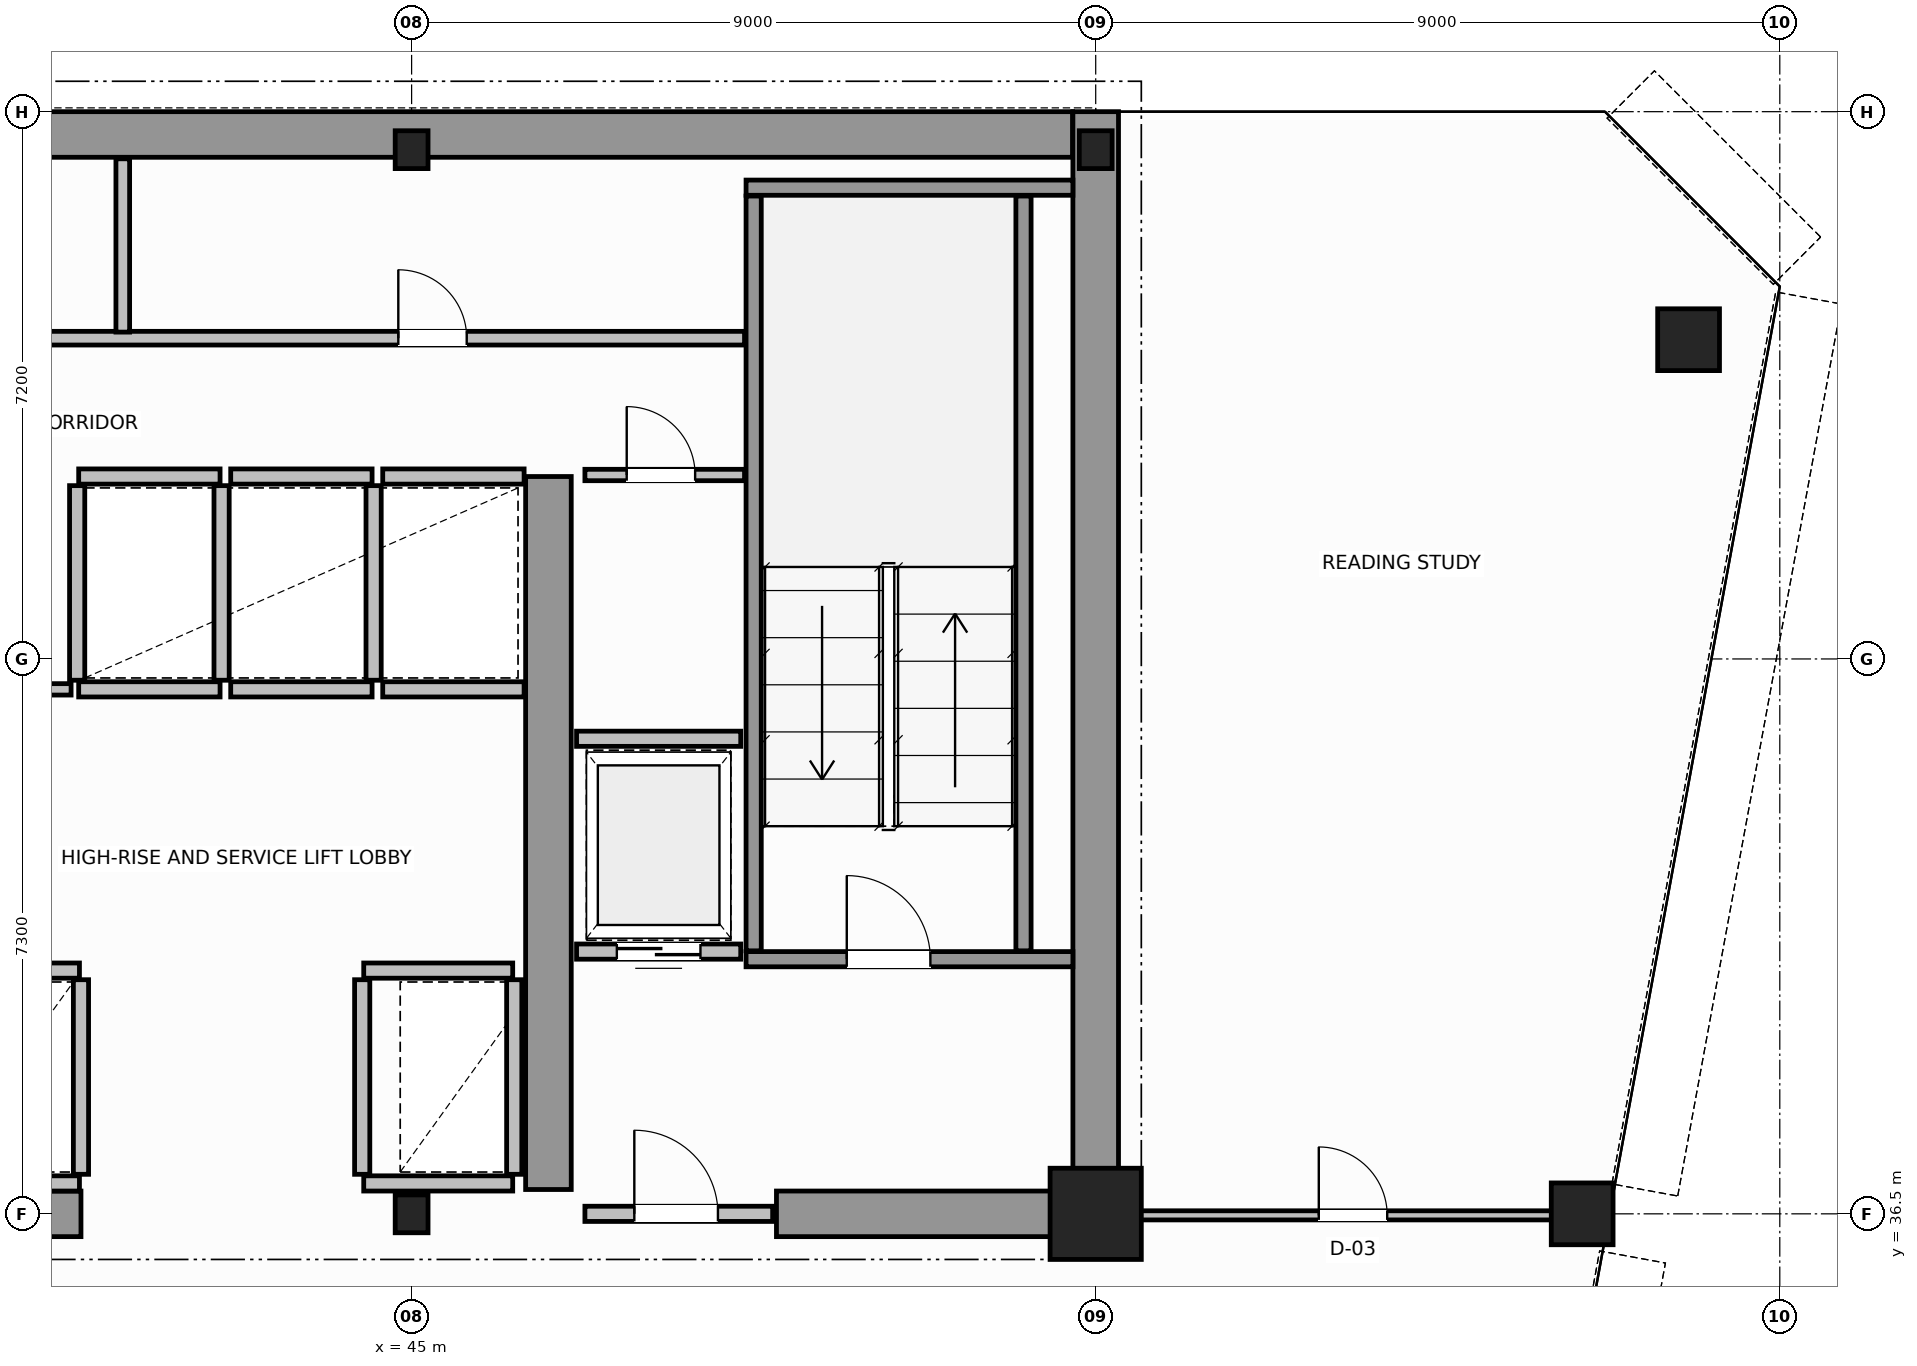
"""IFC4 building model, lengths in metres.
Left out: names, types, materials, properties, quantities, classifications, styles, units other than length and angle.
Written with IfcOpenShell. Run it as: python <this file> out.ifc"""

import sys

from ifc_helpers import new_model, si_unit, direction, frame, frame_2d, origin, origin_2d, place, context, subcontext, project, spatial, rectangle, hollow_circle, i_section, extrude, source, transform, mapped, element, fill, save


model = new_model("IFC4")
c1 = context("Model", 3, precision=1e-05, world=origin(), true_north=direction((0.0, 1.0)))
c2 = subcontext(c1, "Body", "Model", "MODEL_VIEW")
j1 = project(units=[si_unit("LENGTHUNIT", "METRE"), si_unit("PLANEANGLEUNIT", "RADIAN")], contexts=[c1])
p1 = place(None, origin())
s1 = spatial("IfcSite", under=j1, at=p1, CompositionType="ELEMENT")
p2 = place(p1, origin())
s2 = spatial("IfcBuilding", under=s1, at=p2, CompositionType="ELEMENT")
p3 = place(p2, frame((0.0, 0.0, 191.8)))
s3 = spatial("IfcBuildingStorey", under=s2, at=p3, CompositionType="ELEMENT", Elevation=191.8)
m1 = source(origin(), c2, "Body", "SweptSolid", [
    extrude(i_section(OverallWidth=0.432, OverallDepth=0.498, WebThickness=0.055, FlangeThickness=0.068, FilletRadius=0.015, at=origin_2d()), origin(), (0.0, 0.0, 1.0), 3.8),
])
p4 = place(p3, frame((45.0, 36.5, 0.0), z_axis=(0.0, 0.0, 1.0), x_axis=(1.0, 0.0, 0.0)))
e1 = element("IfcColumn", 1, at=p4, inside=s3, PredefinedType="COLUMN", context=c2, shape_type="MappedRepresentation", body=[
    mapped(m1, transform((0.0, 0.0, 0.0), scale=1.0)),
])
m2 = source(origin(), c2, "Body", "SweptSolid", [
    extrude(rectangle(XDim=1.2, YDim=1.2, at=origin_2d()), origin(), (0.0, 0.0, 1.0), 3.8),
])
p5 = place(p3, frame((54.0, 36.5, 0.0), z_axis=(0.0, 0.0, 1.0), x_axis=(1.0, 0.0, 0.0)))
e2 = element("IfcColumn", 2, at=p5, inside=s3, PredefinedType="COLUMN", context=c2, shape_type="MappedRepresentation", body=[
    mapped(m2, transform((0.0, 0.0, 0.0), scale=1.0)),
])
for number, where, z_axis, x_axis in (
    (3, (45.0, 50.5, 0.0), (0.0, 0.0, 1.0), (1.0, 0.0, 0.0)),
    (4, (54.0, 50.5, 0.0), (0.0, 0.0, 1.0), (1.0, 0.0, 0.0)),
):
    element("IfcColumn", number, at=place(p3, frame(where, z_axis=z_axis, x_axis=x_axis)), inside=s3, PredefinedType="COLUMN", context=c2, shape_type="MappedRepresentation", body=[
        mapped(m1, transform((0.0, 0.0, 0.0), scale=1.0)),
    ])
m3 = source(origin(), c2, "Body", "SweptSolid", [
    extrude(hollow_circle(Radius=0.406, WallThickness=0.04, at=origin_2d()), origin(), (0.0, 0.0, 1.0), 3.8),
])
for number, where, z_axis, x_axis in (
    (5, (61.8, 48.0, 0.0), (0.0, 0.0, 1.0), (1.0, 0.0, 0.0)),
    (6, (60.4, 36.5, 0.0), (0.0, 0.0, 1.0), (1.0, 0.0, 0.0)),
):
    element("IfcColumn", number, at=place(p3, frame(where, z_axis=z_axis, x_axis=x_axis)), inside=s3, PredefinedType="COLUMN", context=c2, shape_type="MappedRepresentation", body=[
        mapped(m3, transform((0.0, 0.0, 0.0), scale=1.0)),
    ])
p6 = place(p3, frame((34.002, 50.7, 0.0), z_axis=(0.0, 0.0, 1.0), x_axis=(1.0, 0.0, 0.0)))
e7 = element("IfcWall", 7, at=p6, inside=s3, PredefinedType="SHEAR", context=c2, shape_type="SweptSolid", body=[
    extrude(rectangle(XDim=19.694, YDim=0.6, at=frame_2d((9.847, 0.0))), origin(), (0.0, 0.0, 1.0), 3.8),
])
p7 = place(p3, frame((54.0, 36.5, 0.0), z_axis=(0.0, 0.0, 1.0), x_axis=(0.0, 1.0, 0.0)))
e8 = element("IfcWall", 8, at=p7, inside=s3, PredefinedType="SHEAR", context=c2, shape_type="SweptSolid", body=[
    extrude(rectangle(XDim=14.5, YDim=0.6, at=frame_2d((7.25, 0.0))), origin(), (0.0, 0.0, 1.0), 3.8),
])
p8 = place(p3, frame((36.15, 36.5, 0.0), z_axis=(0.0, 0.0, 1.0), x_axis=(1.0, 0.0, 0.0)))
e9 = element("IfcWall", 9, at=p8, inside=s3, PredefinedType="SHEAR", context=c2, shape_type="SweptSolid", body=[
    extrude(rectangle(XDim=4.5, YDim=0.6, at=frame_2d((2.25, 0.0))), origin(), (0.0, 0.0, 1.0), 3.8),
])
p9 = place(p3, frame((49.8, 36.5, 0.0), z_axis=(0.0, 0.0, 1.0), x_axis=(1.0, 0.0, 0.0)))
e10 = element("IfcWall", 10, at=p9, inside=s3, PredefinedType="SHEAR", context=c2, shape_type="SweptSolid", body=[
    extrude(rectangle(XDim=3.88, YDim=0.6, at=frame_2d((1.94, 0.0))), origin(), (0.0, 0.0, 1.0), 2.58),
])
p10 = place(p3, frame((46.8, 36.82, 0.0), z_axis=(0.0, 0.0, 1.0), x_axis=(0.0, 1.0, 0.0)))
e11 = element("IfcWall", 11, at=p10, inside=s3, PredefinedType="SHEAR", context=c2, shape_type="SweptSolid", body=[
    extrude(rectangle(XDim=9.38, YDim=0.6, at=frame_2d((4.69, 0.0))), origin(), (0.0, 0.0, 1.0), 3.8),
])
p11 = place(p3, frame((49.4, 39.85, 0.0), z_axis=(0.0, 0.0, 1.0), x_axis=(1.0, 0.0, 0.0)))
e12 = element("IfcWall", 12, at=p11, inside=s3, PredefinedType="SOLIDWALL", context=c2, shape_type="SweptSolid", body=[
    extrude(rectangle(XDim=4.3, YDim=0.2, at=frame_2d((2.15, 0.0))), origin(), (0.0, 0.0, 1.0), 3.8),
])
p12 = place(p11, frame((1.325, 0.0, 0.0)))
e13 = element("IfcOpeningElement", 13, at=p12, cuts=e12, PredefinedType="OPENING", context=c2, shape_type="SweptSolid", body=[
    extrude(rectangle(XDim=1.1, YDim=2.15, at=frame_2d((0.55, 1.075))), frame((0.0, 0.11, 0.0), z_axis=(0.0, -1.0, 0.0), x_axis=(1.0, 0.0, 0.0)), (0.0, 0.0, 1.0), 0.22),
])
p13 = place(p3, frame((49.4, 50.0, 0.0), z_axis=(0.0, 0.0, 1.0), x_axis=(1.0, 0.0, 0.0)))
e14 = element("IfcWall", 14, at=p13, inside=s3, PredefinedType="SOLIDWALL", context=c2, shape_type="SweptSolid", body=[
    extrude(rectangle(XDim=4.3, YDim=0.2, at=frame_2d((2.15, 0.0))), origin(), (0.0, 0.0, 1.0), 3.8),
])
for number, where, z_axis, x_axis in (
    (15, (49.5, 39.96, 0.0), (0.0, 0.0, 1.0), (0.0, 1.0, 0.0)),
    (16, (53.05, 39.96, 0.0), (0.0, 0.0, 1.0), (0.0, 1.0, 0.0)),
):
    element("IfcWall", number, at=place(p3, frame(where, z_axis=z_axis, x_axis=x_axis)), inside=s3, PredefinedType="SOLIDWALL", context=c2, shape_type="SweptSolid", body=[
        extrude(rectangle(XDim=9.93, YDim=0.2, at=frame_2d((4.965, 0.0))), origin(), (0.0, 0.0, 1.0), 3.8),
    ])
p14 = place(p3, frame((47.28, 36.5, 0.0), z_axis=(0.0, 0.0, 1.0), x_axis=(1.0, 0.0, 0.0)))
e17 = element("IfcWall", 17, at=p14, inside=s3, PredefinedType="SOLIDWALL", context=c2, shape_type="SweptSolid", body=[
    extrude(rectangle(XDim=2.47, YDim=0.2, at=frame_2d((1.235, 0.0))), origin(), (0.0, 0.0, 1.0), 2.57),
])
p15 = place(p14, frame((0.65, 0.0, 0.0)))
e18 = element("IfcOpeningElement", 18, at=p15, cuts=e17, PredefinedType="OPENING", context=c2, shape_type="SweptSolid", body=[
    extrude(rectangle(XDim=1.1, YDim=2.15, at=frame_2d((0.55, 1.075))), frame((0.0, 0.11, 0.0), z_axis=(0.0, -1.0, 0.0), x_axis=(1.0, 0.0, 0.0)), (0.0, 0.0, 1.0), 0.22),
])
for number, where, z_axis, x_axis in (
    (19, (38.71, 39.7, 0.0), (0.0, 0.0, 1.0), (1.0, 0.0, 0.0)),
    (20, (38.71, 36.9, 0.0), (0.0, 0.0, 1.0), (1.0, 0.0, 0.0)),
):
    element("IfcWall", number, at=place(p3, frame(where, z_axis=z_axis, x_axis=x_axis)), inside=s3, PredefinedType="SOLIDWALL", context=c2, shape_type="SweptSolid", body=[
        extrude(rectangle(XDim=1.92, YDim=0.2, at=frame_2d((0.96, 0.0))), origin(), (0.0, 0.0, 1.0), 3.58),
    ])
p16 = place(p3, frame((40.65, 37.02, 0.0), z_axis=(0.0, 0.0, 1.0), x_axis=(0.0, 1.0, 0.0)))
e21 = element("IfcWall", 21, at=p16, inside=s3, PredefinedType="SOLIDWALL", context=c2, shape_type="SweptSolid", body=[
    extrude(rectangle(XDim=2.56, YDim=0.2, at=frame_2d((1.28, 0.0))), origin(), (0.0, 0.0, 1.0), 3.58),
])
p17 = place(p3, frame((44.37, 39.7, 0.0), z_axis=(0.0, 0.0, 1.0), x_axis=(1.0, 0.0, 0.0)))
e22 = element("IfcWall", 22, at=p17, inside=s3, PredefinedType="SOLIDWALL", context=c2, shape_type="SweptSolid", body=[
    extrude(rectangle(XDim=1.96, YDim=0.2, at=frame_2d((0.98, 0.0))), origin(), (0.0, 0.0, 1.0), 3.58),
])
p18 = place(p3, frame((44.37, 36.9, 0.0), z_axis=(0.0, 0.0, 1.0), x_axis=(1.0, 0.0, 0.0)))
e23 = element("IfcWall", 23, at=p18, inside=s3, PredefinedType="SOLIDWALL", context=c2, shape_type="SweptSolid", body=[
    extrude(rectangle(XDim=1.96, YDim=0.2, at=frame_2d((0.98, 0.0))), origin(), (0.0, 0.0, 1.0), 2.57),
])
for number, where, z_axis, x_axis in (
    (24, (44.35, 37.02, 0.0), (0.0, 0.0, 1.0), (0.0, 1.0, 0.0)),
    (25, (46.35, 37.02, 0.0), (0.0, 0.0, 1.0), (0.0, 1.0, 0.0)),
):
    element("IfcWall", number, at=place(p3, frame(where, z_axis=z_axis, x_axis=x_axis)), inside=s3, PredefinedType="SOLIDWALL", context=c2, shape_type="SweptSolid", body=[
        extrude(rectangle(XDim=2.56, YDim=0.2, at=frame_2d((1.28, 0.0))), origin(), (0.0, 0.0, 1.0), 3.58),
    ])
for number, where, z_axis, x_axis in (
    (26, (40.62, 43.4, 0.0), (0.0, 0.0, 1.0), (1.0, 0.0, 0.0)),
    (27, (40.62, 46.2, 0.0), (0.0, 0.0, 1.0), (1.0, 0.0, 0.0)),
):
    element("IfcWall", number, at=place(p3, frame(where, z_axis=z_axis, x_axis=x_axis)), inside=s3, PredefinedType="SOLIDWALL", context=c2, shape_type="SweptSolid", body=[
        extrude(rectangle(XDim=1.86, YDim=0.2, at=frame_2d((0.93, 0.0))), origin(), (0.0, 0.0, 1.0), 3.58),
    ])
for number, where, z_axis, x_axis in (
    (28, (40.6, 43.52, 0.0), (0.0, 0.0, 1.0), (0.0, 1.0, 0.0)),
    (29, (42.5, 43.52, 0.0), (0.0, 0.0, 1.0), (0.0, 1.0, 0.0)),
):
    element("IfcWall", number, at=place(p3, frame(where, z_axis=z_axis, x_axis=x_axis)), inside=s3, PredefinedType="SOLIDWALL", context=c2, shape_type="SweptSolid", body=[
        extrude(rectangle(XDim=2.56, YDim=0.2, at=frame_2d((1.28, 0.0))), origin(), (0.0, 0.0, 1.0), 3.58),
    ])
for number, where, z_axis, x_axis in (
    (30, (42.62, 43.4, 0.0), (0.0, 0.0, 1.0), (1.0, 0.0, 0.0)),
    (31, (42.62, 46.2, 0.0), (0.0, 0.0, 1.0), (1.0, 0.0, 0.0)),
):
    element("IfcWall", number, at=place(p3, frame(where, z_axis=z_axis, x_axis=x_axis)), inside=s3, PredefinedType="SOLIDWALL", context=c2, shape_type="SweptSolid", body=[
        extrude(rectangle(XDim=1.86, YDim=0.2, at=frame_2d((0.93, 0.0))), origin(), (0.0, 0.0, 1.0), 3.58),
    ])
p19 = place(p3, frame((44.5, 43.52, 0.0), z_axis=(0.0, 0.0, 1.0), x_axis=(0.0, 1.0, 0.0)))
e32 = element("IfcWall", 32, at=p19, inside=s3, PredefinedType="SOLIDWALL", context=c2, shape_type="SweptSolid", body=[
    extrude(rectangle(XDim=2.56, YDim=0.2, at=frame_2d((1.28, 0.0))), origin(), (0.0, 0.0, 1.0), 3.58),
])
for number, where, z_axis, x_axis in (
    (33, (44.62, 43.4, 0.0), (0.0, 0.0, 1.0), (1.0, 0.0, 0.0)),
    (34, (44.62, 46.2, 0.0), (0.0, 0.0, 1.0), (1.0, 0.0, 0.0)),
):
    element("IfcWall", number, at=place(p3, frame(where, z_axis=z_axis, x_axis=x_axis)), inside=s3, PredefinedType="SOLIDWALL", context=c2, shape_type="SweptSolid", body=[
        extrude(rectangle(XDim=1.86, YDim=0.2, at=frame_2d((0.93, 0.0))), origin(), (0.0, 0.0, 1.0), 3.58),
    ])
p20 = place(p3, frame((47.17, 39.95, 0.0), z_axis=(0.0, 0.0, 1.0), x_axis=(1.0, 0.0, 0.0)))
e35 = element("IfcWall", 35, at=p20, inside=s3, PredefinedType="SOLIDWALL", context=c2, shape_type="SweptSolid", body=[
    extrude(rectangle(XDim=2.16, YDim=0.2, at=frame_2d((1.08, 0.0))), origin(), (0.0, 0.0, 1.0), 3.58),
])
p21 = place(p20, frame((0.53, 0.0, 0.0)))
e36 = element("IfcOpeningElement", 36, at=p21, cuts=e35, PredefinedType="OPENING", context=c2, shape_type="SweptSolid", body=[
    extrude(rectangle(XDim=1.1, YDim=2.15, at=frame_2d((0.55, 1.075))), frame((0.0, 0.11, 0.0), z_axis=(0.0, -1.0, 0.0), x_axis=(1.0, 0.0, 0.0)), (0.0, 0.0, 1.0), 0.22),
])
p22 = place(p3, frame((47.17, 42.75, 0.0), z_axis=(0.0, 0.0, 1.0), x_axis=(1.0, 0.0, 0.0)))
e37 = element("IfcWall", 37, at=p22, inside=s3, PredefinedType="SOLIDWALL", context=c2, shape_type="SweptSolid", body=[
    extrude(rectangle(XDim=2.16, YDim=0.2, at=frame_2d((1.08, 0.0))), origin(), (0.0, 0.0, 1.0), 3.58),
])
p23 = place(p3, frame((47.28, 46.22, 0.0), z_axis=(0.0, 0.0, 1.0), x_axis=(1.0, 0.0, 0.0)))
e38 = element("IfcWall", 38, at=p23, inside=s3, PredefinedType="PARTITIONING", context=c2, shape_type="SweptSolid", body=[
    extrude(rectangle(XDim=2.1, YDim=0.15, at=frame_2d((1.05, 0.0))), origin(), (0.0, 0.0, 1.0), 3.58),
])
p24 = place(p23, frame((0.55, 0.0, 0.0)))
e39 = element("IfcOpeningElement", 39, at=p24, cuts=e38, PredefinedType="OPENING", context=c2, shape_type="SweptSolid", body=[
    extrude(rectangle(XDim=0.9, YDim=2.1, at=frame_2d((0.45, 1.05))), frame((0.0, 0.085, 0.0), z_axis=(0.0, -1.0, 0.0), x_axis=(1.0, 0.0, 0.0)), (0.0, 0.0, 1.0), 0.17),
])
p25 = place(p3, frame((38.92, 43.4, 0.0), z_axis=(0.0, 0.0, 1.0), x_axis=(1.0, 0.0, 0.0)))
e40 = element("IfcWall", 40, at=p25, inside=s3, PredefinedType="PARTITIONING", context=c2, shape_type="SweptSolid", body=[
    extrude(rectangle(XDim=1.6, YDim=0.15, at=frame_2d((0.8, 0.0))), origin(), (0.0, 0.0, 1.0), 3.58),
])
p26 = place(p25, frame((0.35, 0.0, 0.0)))
e41 = element("IfcOpeningElement", 41, at=p26, cuts=e40, PredefinedType="OPENING", context=c2, shape_type="SweptSolid", body=[
    extrude(rectangle(XDim=0.9, YDim=2.1, at=frame_2d((0.45, 1.05))), frame((0.0, 0.085, 0.0), z_axis=(0.0, -1.0, 0.0), x_axis=(1.0, 0.0, 0.0)), (0.0, 0.0, 1.0), 0.17),
])
p27 = place(p3, frame((18.62, 48.02, 0.0), z_axis=(0.0, 0.0, 1.0), x_axis=(1.0, 0.0, 0.0)))
e42 = element("IfcWall", 42, at=p27, inside=s3, PredefinedType="PLUMBINGWALL", context=c2, shape_type="SweptSolid", body=[
    extrude(rectangle(XDim=30.76, YDim=0.18, at=frame_2d((15.38, 0.0))), origin(), (0.0, 0.0, 1.0), 3.58),
])
p28 = place(p27, frame((1.955, 0.0, 0.0)))
e43 = element("IfcOpeningElement", 43, at=p28, cuts=e42, PredefinedType="OPENING", context=c2, shape_type="SweptSolid", body=[
    extrude(rectangle(XDim=0.9, YDim=2.15, at=frame_2d((0.45, 1.075))), frame((0.0, 0.1, 0.0), z_axis=(0.0, -1.0, 0.0), x_axis=(1.0, 0.0, 0.0)), (0.0, 0.0, 1.0), 0.2),
])
p29 = place(p27, frame((8.03, 0.0, 0.0)))
e44 = element("IfcOpeningElement", 44, at=p29, cuts=e42, PredefinedType="OPENING", context=c2, shape_type="SweptSolid", body=[
    extrude(rectangle(XDim=0.9, YDim=2.15, at=frame_2d((0.45, 1.075))), frame((0.0, 0.1, 0.0), z_axis=(0.0, -1.0, 0.0), x_axis=(1.0, 0.0, 0.0)), (0.0, 0.0, 1.0), 0.2),
])
p30 = place(p27, frame((16.93, 0.0, 0.0)))
e45 = element("IfcOpeningElement", 45, at=p30, cuts=e42, PredefinedType="OPENING", context=c2, shape_type="SweptSolid", body=[
    extrude(rectangle(XDim=0.9, YDim=2.15, at=frame_2d((0.45, 1.075))), frame((0.0, 0.1, 0.0), z_axis=(0.0, -1.0, 0.0), x_axis=(1.0, 0.0, 0.0)), (0.0, 0.0, 1.0), 0.2),
])
p31 = place(p27, frame((26.205, 0.0, 0.0)))
e46 = element("IfcOpeningElement", 46, at=p31, cuts=e42, PredefinedType="OPENING", context=c2, shape_type="SweptSolid", body=[
    extrude(rectangle(XDim=0.9, YDim=2.15, at=frame_2d((0.45, 1.075))), frame((0.0, 0.1, 0.0), z_axis=(0.0, -1.0, 0.0), x_axis=(1.0, 0.0, 0.0)), (0.0, 0.0, 1.0), 0.2),
])
p32 = place(p3, frame((41.2, 48.1, 0.0), z_axis=(0.0, 0.0, 1.0), x_axis=(0.0, 1.0, 0.0)))
e47 = element("IfcWall", 47, at=p32, inside=s3, PredefinedType="PLUMBINGWALL", context=c2, shape_type="SweptSolid", body=[
    extrude(rectangle(XDim=2.28, YDim=0.18, at=frame_2d((1.14, 0.0))), origin(), (0.0, 0.0, 1.0), 3.58),
])
p33 = place(p3, frame((54.06, 36.48, 0.0), z_axis=(0.0, 0.0, 1.0), x_axis=(1.0, 0.0, 0.0)))
e48 = element("IfcWall", 48, at=p33, inside=s3, PredefinedType="PARTITIONING", context=c2, shape_type="SweptSolid", body=[
    extrude(rectangle(XDim=6.651, YDim=0.12, at=frame_2d((3.325, 0.0))), origin(), (0.0, 0.0, 1.0), 2.97),
])
p34 = place(p33, frame((2.875, 0.0, 0.0)))
e49 = element("IfcOpeningElement", 49, at=p34, cuts=e48, PredefinedType="OPENING", context=c2, shape_type="SweptSolid", body=[
    extrude(rectangle(XDim=0.9, YDim=2.15, at=frame_2d((0.45, 1.075))), frame((0.0, 0.07, 0.0), z_axis=(0.0, -1.0, 0.0), x_axis=(1.0, 0.0, 0.0)), (0.0, 0.0, 1.0), 0.14),
])
m4 = source(origin(), c2, "Body", "SweptSolid", [
    extrude(rectangle(XDim=1.1, YDim=2.15, at=frame_2d((0.55, 1.075))), frame((0.0, 0.025, 0.0), z_axis=(0.0, -1.0, 0.0), x_axis=(1.0, 0.0, 0.0)), (0.0, 0.0, 1.0), 0.05),
])
p35 = place(p12, origin())
e50 = element("IfcDoor", 50, at=p35, inside=s3, OperationType="SINGLE_SWING_RIGHT", PredefinedType="DOOR", context=c2, shape_type="MappedRepresentation", body=[
    mapped(m4, transform((0.0, 0.0, 0.0), scale=1.0)),
])
fill(e13, e50)
p36 = place(p15, origin())
e51 = element("IfcDoor", 51, at=p36, inside=s3, OperationType="SINGLE_SWING_LEFT", PredefinedType="DOOR", context=c2, shape_type="MappedRepresentation", body=[
    mapped(m4, transform((0.0, 0.0, 0.0), scale=1.0)),
])
fill(e18, e51)
p37 = place(p21, origin())
e52 = element("IfcDoor", 52, at=p37, inside=s3, OperationType="DOUBLE_DOOR_SLIDING", PredefinedType="DOOR", context=c2, shape_type="MappedRepresentation", body=[
    mapped(m4, transform((0.0, 0.0, 0.0), scale=1.0)),
])
fill(e36, e52)
m5 = source(origin(), c2, "Body", "SweptSolid", [
    extrude(rectangle(XDim=0.9, YDim=2.1, at=frame_2d((0.45, 1.05))), frame((0.0, 0.025, 0.0), z_axis=(0.0, -1.0, 0.0), x_axis=(1.0, 0.0, 0.0)), (0.0, 0.0, 1.0), 0.05),
])
p38 = place(p24, origin())
e53 = element("IfcDoor", 53, at=p38, inside=s3, OperationType="SINGLE_SWING_RIGHT", PredefinedType="DOOR", context=c2, shape_type="MappedRepresentation", body=[
    mapped(m5, transform((0.0, 0.0, 0.0), scale=1.0)),
])
fill(e39, e53)
m6 = source(origin(), c2, "Body", "SweptSolid", [
    extrude(rectangle(XDim=0.9, YDim=2.15, at=frame_2d((0.45, 1.075))), frame((0.0, 0.025, 0.0), z_axis=(0.0, -1.0, 0.0), x_axis=(1.0, 0.0, 0.0)), (0.0, 0.0, 1.0), 0.05),
])
p39 = place(p31, origin())
e54 = element("IfcDoor", 54, at=p39, inside=s3, OperationType="SINGLE_SWING_RIGHT", PredefinedType="DOOR", context=c2, shape_type="MappedRepresentation", body=[
    mapped(m6, transform((0.0, 0.0, 0.0), scale=1.0)),
])
fill(e46, e54)
p40 = place(p34, origin())
e55 = element("IfcDoor", 55, at=p40, inside=s3, OperationType="SINGLE_SWING_RIGHT", PredefinedType="DOOR", context=c2, shape_type="MappedRepresentation", body=[
    mapped(m6, transform((0.0, 0.0, 0.0), scale=1.0)),
])
fill(e49, e55)
save(model, sys.argv[1])
